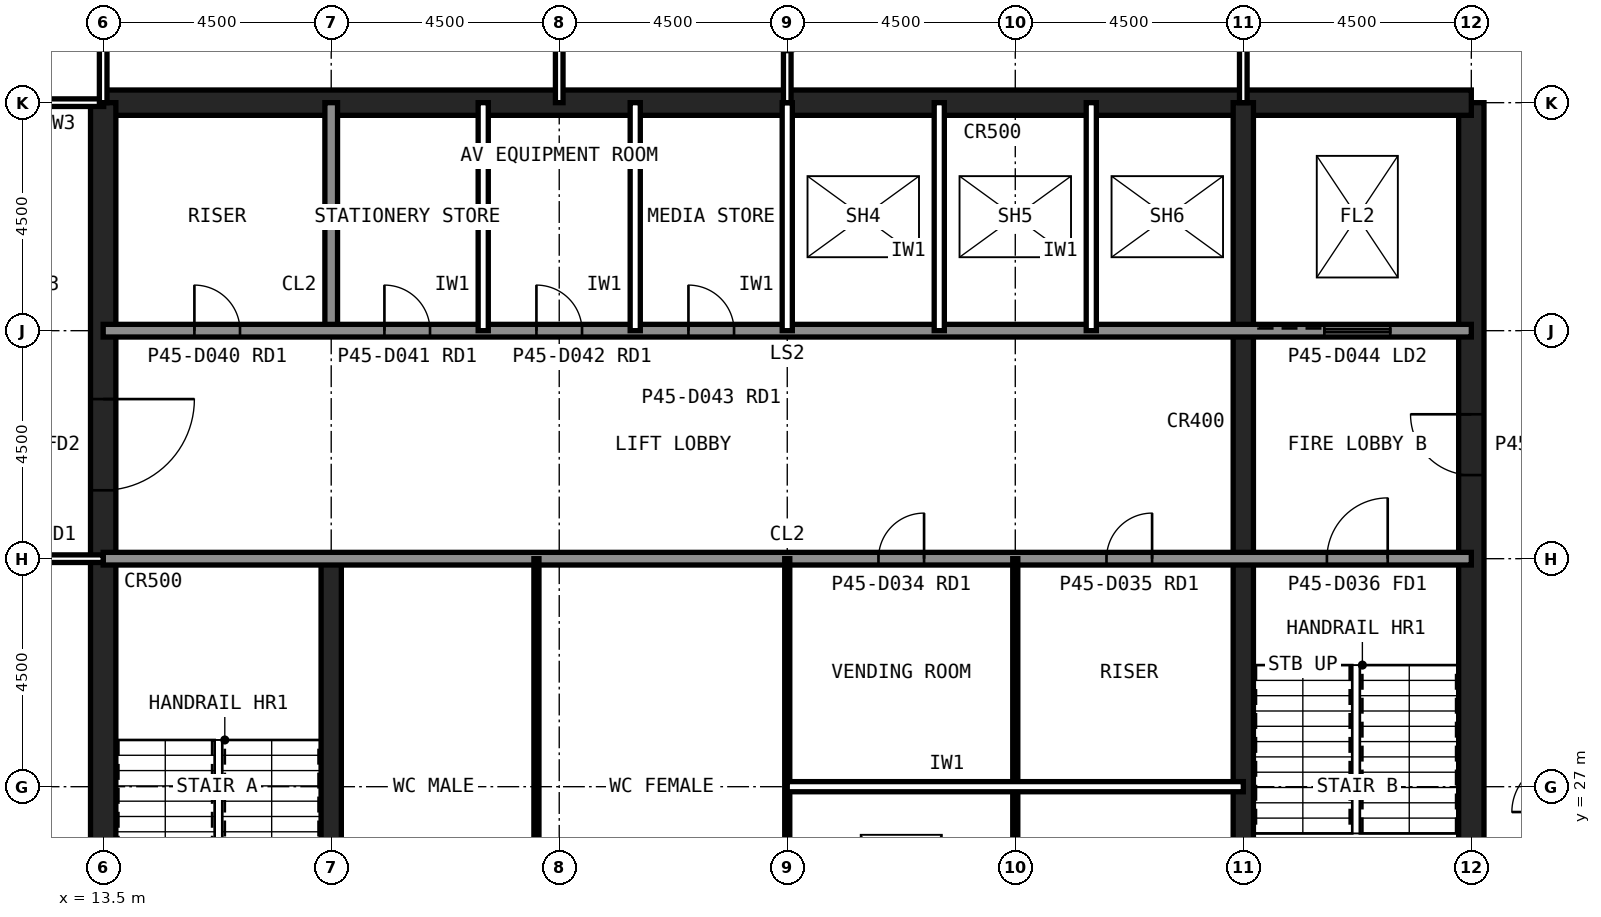
"""IFC4 building model, lengths in metres.
Left out: names, types, materials, properties, quantities, classifications, styles, units other than length and angle.
Written with IfcOpenShell. Run it as: python <this file> out.ifc"""

import sys

from ifc_helpers import new_model, si_unit, direction, frame, frame_2d, origin, place, context, subcontext, project, spatial, rectangle, extrude, element, fill, save


model = new_model("IFC4")
c1 = context("Model", 3, precision=1e-05, world=origin(), true_north=direction((0.0, 1.0)))
c2 = subcontext(c1, "Body", "Model", "MODEL_VIEW")
j1 = project(units=[si_unit("LENGTHUNIT", "METRE"), si_unit("PLANEANGLEUNIT", "RADIAN")], contexts=[c1])
p1 = place(None, origin())
s1 = spatial("IfcSite", under=j1, at=p1, CompositionType="ELEMENT")
p2 = place(p1, origin())
s2 = spatial("IfcBuilding", under=s1, at=p2, CompositionType="ELEMENT")
p3 = place(p2, frame((0.0, 0.0, 191.6)))
s3 = spatial("IfcBuildingStorey", under=s2, at=p3, CompositionType="ELEMENT", Elevation=191.6)
p4 = place(p3, frame((40.5, 13.5, 0.0), z_axis=(0.0, 0.0, 1.0), x_axis=(0.0, 1.0, 0.0)))
e1 = element("IfcWall", 1, at=p4, inside=s3, PredefinedType="SHEAR", context=c2, shape_type="SweptSolid", body=[
    extrude(rectangle(XDim=27.0, YDim=0.5, at=frame_2d((13.5, 0.0))), origin(), (0.0, 0.0, 1.0), 4.0),
])
p5 = place(p4, frame((5.85, 0.0, 0.0)))
e2 = element("IfcOpeningElement", 2, at=p5, cuts=e1, PredefinedType="OPENING", context=c2, shape_type="SweptSolid", body=[
    extrude(rectangle(XDim=1.8, YDim=2.1, at=frame_2d((0.9, 1.05))), frame((0.0, 0.26, 0.0), z_axis=(0.0, -1.0, 0.0), x_axis=(1.0, 0.0, 0.0)), (0.0, 0.0, 1.0), 0.52),
])
p6 = place(p4, frame((19.65, 0.0, 0.0)))
e3 = element("IfcOpeningElement", 3, at=p6, cuts=e1, PredefinedType="OPENING", context=c2, shape_type="SweptSolid", body=[
    extrude(rectangle(XDim=1.2, YDim=2.1, at=frame_2d((0.6, 1.05))), frame((0.0, 0.26, 0.0), z_axis=(0.0, -1.0, 0.0), x_axis=(1.0, 0.0, 0.0)), (0.0, 0.0, 1.0), 0.52),
])
p7 = place(p3, frame((40.5, 40.5, 0.0), z_axis=(0.0, 0.0, 1.0), x_axis=(-1.0, 0.0, 0.0)))
e4 = element("IfcWall", 4, at=p7, inside=s3, PredefinedType="SHEAR", context=c2, shape_type="SweptSolid", body=[
    extrude(rectangle(XDim=27.0, YDim=0.5, at=frame_2d((13.5, 0.0))), origin(), (0.0, 0.0, 1.0), 4.0),
])
p8 = place(p3, frame((13.5, 40.5, 0.0), z_axis=(0.0, 0.0, 1.0), x_axis=(0.0, -1.0, 0.0)))
e5 = element("IfcWall", 5, at=p8, inside=s3, PredefinedType="SHEAR", context=c2, shape_type="SweptSolid", body=[
    extrude(rectangle(XDim=27.0, YDim=0.5, at=frame_2d((13.5, 0.0))), origin(), (0.0, 0.0, 1.0), 4.0),
])
p9 = place(p8, frame((19.65, 0.0, 0.0)))
e6 = element("IfcOpeningElement", 6, at=p9, cuts=e5, PredefinedType="OPENING", context=c2, shape_type="SweptSolid", body=[
    extrude(rectangle(XDim=1.2, YDim=2.1, at=frame_2d((0.6, 1.05))), frame((0.0, 0.26, 0.0), z_axis=(0.0, -1.0, 0.0), x_axis=(1.0, 0.0, 0.0)), (0.0, 0.0, 1.0), 0.52),
])
p10 = place(p8, frame((5.85, 0.0, 0.0)))
e7 = element("IfcOpeningElement", 7, at=p10, cuts=e5, PredefinedType="OPENING", context=c2, shape_type="SweptSolid", body=[
    extrude(rectangle(XDim=1.8, YDim=2.1, at=frame_2d((0.9, 1.05))), frame((0.0, 0.26, 0.0), z_axis=(0.0, -1.0, 0.0), x_axis=(1.0, 0.0, 0.0)), (0.0, 0.0, 1.0), 0.52),
])
p11 = place(p3, frame((18.0, 13.5, 0.0), z_axis=(0.0, 0.0, 1.0), x_axis=(0.0, 1.0, 0.0)))
e8 = element("IfcWall", 8, at=p11, inside=s3, PredefinedType="SHEAR", context=c2, shape_type="SweptSolid", body=[
    extrude(rectangle(XDim=18.0, YDim=0.4, at=frame_2d((9.0, 0.0))), origin(), (0.0, 0.0, 1.0), 4.0),
])
p12 = place(p3, frame((18.0, 36.0, 0.0), z_axis=(0.0, 0.0, 1.0), x_axis=(0.0, 1.0, 0.0)))
e9 = element("IfcWall", 9, at=p12, inside=s3, PredefinedType="SOLIDWALL", context=c2, shape_type="SweptSolid", body=[
    extrude(rectangle(XDim=4.5, YDim=0.25, at=frame_2d((2.25, 0.0))), origin(), (0.0, 0.0, 1.0), 3.84),
])
p13 = place(p3, frame((36.0, 22.5, 0.0), z_axis=(0.0, 0.0, 1.0), x_axis=(0.0, 1.0, 0.0)))
e10 = element("IfcWall", 10, at=p13, inside=s3, PredefinedType="SHEAR", context=c2, shape_type="SweptSolid", body=[
    extrude(rectangle(XDim=18.0, YDim=0.4, at=frame_2d((9.0, 0.0))), origin(), (0.0, 0.0, 1.0), 4.0),
])
p14 = place(p3, frame((13.5, 36.0, 0.0), z_axis=(0.0, 0.0, 1.0), x_axis=(1.0, 0.0, 0.0)))
e11 = element("IfcWall", 11, at=p14, inside=s3, PredefinedType="SOLIDWALL", context=c2, shape_type="SweptSolid", body=[
    extrude(rectangle(XDim=27.0, YDim=0.25, at=frame_2d((13.5, 0.0))), origin(), (0.0, 0.0, 1.0), 3.84),
])
p15 = place(p14, frame((1.8, 0.0, 0.0)))
e12 = element("IfcOpeningElement", 12, at=p15, cuts=e11, PredefinedType="OPENING", context=c2, shape_type="SweptSolid", body=[
    extrude(rectangle(XDim=0.9, YDim=2.1, at=frame_2d((0.45, 1.05))), frame((0.0, 0.135, 0.0), z_axis=(0.0, -1.0, 0.0), x_axis=(1.0, 0.0, 0.0)), (0.0, 0.0, 1.0), 0.27),
])
p16 = place(p14, frame((5.55, 0.0, 0.0)))
e13 = element("IfcOpeningElement", 13, at=p16, cuts=e11, PredefinedType="OPENING", context=c2, shape_type="SweptSolid", body=[
    extrude(rectangle(XDim=0.9, YDim=2.1, at=frame_2d((0.45, 1.05))), frame((0.0, 0.135, 0.0), z_axis=(0.0, -1.0, 0.0), x_axis=(1.0, 0.0, 0.0)), (0.0, 0.0, 1.0), 0.27),
])
p17 = place(p14, frame((8.55, 0.0, 0.0)))
e14 = element("IfcOpeningElement", 14, at=p17, cuts=e11, PredefinedType="OPENING", context=c2, shape_type="SweptSolid", body=[
    extrude(rectangle(XDim=0.9, YDim=2.1, at=frame_2d((0.45, 1.05))), frame((0.0, 0.135, 0.0), z_axis=(0.0, -1.0, 0.0), x_axis=(1.0, 0.0, 0.0)), (0.0, 0.0, 1.0), 0.27),
])
p18 = place(p14, frame((11.55, 0.0, 0.0)))
e15 = element("IfcOpeningElement", 15, at=p18, cuts=e11, PredefinedType="OPENING", context=c2, shape_type="SweptSolid", body=[
    extrude(rectangle(XDim=0.9, YDim=2.1, at=frame_2d((0.45, 1.05))), frame((0.0, 0.135, 0.0), z_axis=(0.0, -1.0, 0.0), x_axis=(1.0, 0.0, 0.0)), (0.0, 0.0, 1.0), 0.27),
])
p19 = place(p14, frame((24.1, 0.0, 0.0)))
e16 = element("IfcOpeningElement", 16, at=p19, cuts=e11, PredefinedType="OPENING", context=c2, shape_type="SweptSolid", body=[
    extrude(rectangle(XDim=1.3, YDim=2.2, at=frame_2d((0.65, 1.1))), frame((0.0, 0.135, 0.0), z_axis=(0.0, -1.0, 0.0), x_axis=(1.0, 0.0, 0.0)), (0.0, 0.0, 1.0), 0.27),
])
p20 = place(p3, frame((13.5, 31.5, 0.0), z_axis=(0.0, 0.0, 1.0), x_axis=(1.0, 0.0, 0.0)))
e17 = element("IfcWall", 17, at=p20, inside=s3, PredefinedType="SOLIDWALL", context=c2, shape_type="SweptSolid", body=[
    extrude(rectangle(XDim=27.0, YDim=0.25, at=frame_2d((13.5, 0.0))), origin(), (0.0, 0.0, 1.0), 3.84),
])
p21 = place(p20, frame((24.15, 0.0, 0.0)))
e18 = element("IfcOpeningElement", 18, at=p21, cuts=e17, PredefinedType="OPENING", context=c2, shape_type="SweptSolid", body=[
    extrude(rectangle(XDim=1.2, YDim=2.1, at=frame_2d((0.6, 1.05))), frame((0.0, 0.135, 0.0), z_axis=(0.0, -1.0, 0.0), x_axis=(1.0, 0.0, 0.0)), (0.0, 0.0, 1.0), 0.27),
])
p22 = place(p20, frame((15.3, 0.0, 0.0)))
e19 = element("IfcOpeningElement", 19, at=p22, cuts=e17, PredefinedType="OPENING", context=c2, shape_type="SweptSolid", body=[
    extrude(rectangle(XDim=0.9, YDim=2.1, at=frame_2d((0.45, 1.05))), frame((0.0, 0.135, 0.0), z_axis=(0.0, -1.0, 0.0), x_axis=(1.0, 0.0, 0.0)), (0.0, 0.0, 1.0), 0.27),
])
p23 = place(p20, frame((19.8, 0.0, 0.0)))
e20 = element("IfcOpeningElement", 20, at=p23, cuts=e17, PredefinedType="OPENING", context=c2, shape_type="SweptSolid", body=[
    extrude(rectangle(XDim=0.9, YDim=2.1, at=frame_2d((0.45, 1.05))), frame((0.0, 0.135, 0.0), z_axis=(0.0, -1.0, 0.0), x_axis=(1.0, 0.0, 0.0)), (0.0, 0.0, 1.0), 0.27),
])
for number, where, z_axis, x_axis in (
    (21, (21.0, 36.0, 0.0), (0.0, 0.0, 1.0), (0.0, 1.0, 0.0)),
    (22, (24.0, 36.0, 0.0), (0.0, 0.0, 1.0), (0.0, 1.0, 0.0)),
    (23, (27.0, 36.0, 0.0), (0.0, 0.0, 1.0), (0.0, 1.0, 0.0)),
    (24, (30.0, 36.0, 0.0), (0.0, 0.0, 1.0), (0.0, 1.0, 0.0)),
    (25, (33.0, 36.0, 0.0), (0.0, 0.0, 1.0), (0.0, 1.0, 0.0)),
):
    element("IfcWall", number, at=place(p3, frame(where, z_axis=z_axis, x_axis=x_axis)), inside=s3, PredefinedType="PARTITIONING", context=c2, shape_type="SweptSolid", body=[
        extrude(rectangle(XDim=4.5, YDim=0.2, at=frame_2d((2.25, 0.0))), origin(), (0.0, 0.0, 1.0), 3.84),
    ])
for number, where, z_axis, x_axis in (
    (26, (22.05, 22.5, 0.0), (0.0, 0.0, 1.0), (0.0, 1.0, 0.0)),
    (27, (27.0, 22.5, 0.0), (0.0, 0.0, 1.0), (0.0, 1.0, 0.0)),
    (28, (31.5, 22.5, 0.0), (0.0, 0.0, 1.0), (0.0, 1.0, 0.0)),
):
    element("IfcWall", number, at=place(p3, frame(where, z_axis=z_axis, x_axis=x_axis)), inside=s3, PredefinedType="PLUMBINGWALL", context=c2, shape_type="SweptSolid", body=[
        extrude(rectangle(XDim=9.0, YDim=0.1, at=frame_2d((4.5, 0.0))), origin(), (0.0, 0.0, 1.0), 3.84),
    ])
p24 = place(p3, frame((27.0, 27.0, 0.0), z_axis=(0.0, 0.0, 1.0), x_axis=(1.0, 0.0, 0.0)))
e29 = element("IfcWall", 29, at=p24, inside=s3, PredefinedType="PARTITIONING", context=c2, shape_type="SweptSolid", body=[
    extrude(rectangle(XDim=9.0, YDim=0.2, at=frame_2d((4.5, 0.0))), origin(), (0.0, 0.0, 1.0), 3.84),
])
p25 = place(p3, frame((13.51, 40.5, 0.0), z_axis=(0.0, 0.0, 1.0), x_axis=(-1.0, 0.0, 0.0)))
e30 = element("IfcWall", 30, at=p25, inside=s3, PredefinedType="PARTITIONING", context=c2, shape_type="SweptSolid", body=[
    extrude(rectangle(XDim=1.81, YDim=0.15, at=frame_2d((0.905, 0.0))), origin(), (0.0, 0.0, 1.0), 2.989),
])
p26 = place(p3, frame((13.5, 31.5, 0.0), z_axis=(0.0, 0.0, 1.0), x_axis=(-1.0, 0.0, 0.0)))
e31 = element("IfcWall", 31, at=p26, inside=s3, PredefinedType="PARTITIONING", context=c2, shape_type="SweptSolid", body=[
    extrude(rectangle(XDim=3.6, YDim=0.15, at=frame_2d((1.8, 0.0))), origin(), (0.0, 0.0, 1.0), 2.989),
])
p27 = place(p26, frame((1.3, 0.0, 0.0)))
e32 = element("IfcOpeningElement", 32, at=p27, cuts=e31, PredefinedType="OPENING", context=c2, shape_type="SweptSolid", body=[
    extrude(rectangle(XDim=1.0, YDim=2.1, at=frame_2d((0.5, 1.05))), frame((0.0, 0.085, 0.0), z_axis=(0.0, -1.0, 0.0), x_axis=(1.0, 0.0, 0.0)), (0.0, 0.0, 1.0), 0.17),
])
p28 = place(p3, frame((36.0, 40.5, 0.0), z_axis=(0.0, 0.0, 1.0), x_axis=(0.0, 1.0, 0.0)))
e33 = element("IfcWall", 33, at=p28, inside=s3, PredefinedType="PARTITIONING", context=c2, shape_type="SweptSolid", body=[
    extrude(rectangle(XDim=3.0, YDim=0.15, at=frame_2d((1.5, 0.0))), origin(), (0.0, 0.0, 1.0), 2.989),
])
p29 = place(p3, frame((27.0, 43.5, 0.0), z_axis=(0.0, 0.0, 1.0), x_axis=(0.0, -1.0, 0.0)))
e34 = element("IfcWall", 34, at=p29, inside=s3, PredefinedType="PARTITIONING", context=c2, shape_type="SweptSolid", body=[
    extrude(rectangle(XDim=3.0, YDim=0.15, at=frame_2d((1.5, 0.0))), origin(), (0.0, 0.0, 1.0), 2.989),
])
p30 = place(p29, frame((1.0, 0.0, 0.0)))
e35 = element("IfcOpeningElement", 35, at=p30, cuts=e34, PredefinedType="OPENING", context=c2, shape_type="SweptSolid", body=[
    extrude(rectangle(XDim=1.0, YDim=2.1, at=frame_2d((0.5, 1.05))), frame((0.0, 0.085, 0.0), z_axis=(0.0, -1.0, 0.0), x_axis=(1.0, 0.0, 0.0)), (0.0, 0.0, 1.0), 0.17),
])
p31 = place(p3, frame((22.5, 40.5, 0.0), z_axis=(0.0, 0.0, 1.0), x_axis=(0.0, 1.0, 0.0)))
e36 = element("IfcWall", 36, at=p31, inside=s3, PredefinedType="PARTITIONING", context=c2, shape_type="SweptSolid", body=[
    extrude(rectangle(XDim=9.0, YDim=0.15, at=frame_2d((4.5, 0.0))), origin(), (0.0, 0.0, 1.0), 2.989),
])
p32 = place(p31, frame((4.0, 0.0, 0.0)))
e37 = element("IfcOpeningElement", 37, at=p32, cuts=e36, PredefinedType="OPENING", context=c2, shape_type="SweptSolid", body=[
    extrude(rectangle(XDim=1.0, YDim=2.1, at=frame_2d((0.5, 1.05))), frame((0.0, 0.085, 0.0), z_axis=(0.0, -1.0, 0.0), x_axis=(1.0, 0.0, 0.0)), (0.0, 0.0, 1.0), 0.17),
])
p33 = place(p3, frame((13.5, 40.5, 0.0), z_axis=(0.0, 0.0, 1.0), x_axis=(0.0, 1.0, 0.0)))
e38 = element("IfcWall", 38, at=p33, inside=s3, PredefinedType="PARTITIONING", context=c2, shape_type="SweptSolid", body=[
    extrude(rectangle(XDim=9.0, YDim=0.15, at=frame_2d((4.5, 0.0))), origin(), (0.0, 0.0, 1.0), 2.989),
])
p34 = place(p33, frame((4.0, 0.0, 0.0)))
e39 = element("IfcOpeningElement", 39, at=p34, cuts=e38, PredefinedType="OPENING", context=c2, shape_type="SweptSolid", body=[
    extrude(rectangle(XDim=1.0, YDim=2.1, at=frame_2d((0.5, 1.05))), frame((0.0, 0.085, 0.0), z_axis=(0.0, -1.0, 0.0), x_axis=(1.0, 0.0, 0.0)), (0.0, 0.0, 1.0), 0.17),
])
p35 = place(p10, origin())
e40 = element("IfcDoor", 40, at=p35, inside=s3, OperationType="SINGLE_SWING_LEFT", PredefinedType="DOOR", context=c2, shape_type="SweptSolid", body=[
    extrude(rectangle(XDim=1.8, YDim=2.1, at=frame_2d((0.9, 1.05))), frame((0.0, 0.025, 0.0), z_axis=(0.0, -1.0, 0.0), x_axis=(1.0, 0.0, 0.0)), (0.0, 0.0, 1.0), 0.05),
])
fill(e7, e40)
p36 = place(p6, origin())
e41 = element("IfcDoor", 41, at=p36, inside=s3, OperationType="SINGLE_SWING_RIGHT", PredefinedType="DOOR", context=c2, shape_type="SweptSolid", body=[
    extrude(rectangle(XDim=1.2, YDim=2.1, at=frame_2d((0.6, 1.05))), frame((0.0, 0.025, 0.0), z_axis=(0.0, -1.0, 0.0), x_axis=(1.0, 0.0, 0.0)), (0.0, 0.0, 1.0), 0.05),
])
fill(e3, e41)
p37 = place(p21, origin())
e42 = element("IfcDoor", 42, at=p37, inside=s3, OperationType="SINGLE_SWING_RIGHT", PredefinedType="DOOR", context=c2, shape_type="SweptSolid", body=[
    extrude(rectangle(XDim=1.2, YDim=2.1, at=frame_2d((0.6, 1.05))), frame((0.0, 0.025, 0.0), z_axis=(0.0, -1.0, 0.0), x_axis=(1.0, 0.0, 0.0)), (0.0, 0.0, 1.0), 0.05),
])
fill(e18, e42)
p38 = place(p22, origin())
e43 = element("IfcDoor", 43, at=p38, inside=s3, OperationType="SINGLE_SWING_RIGHT", PredefinedType="DOOR", context=c2, shape_type="SweptSolid", body=[
    extrude(rectangle(XDim=0.9, YDim=2.1, at=frame_2d((0.45, 1.05))), frame((0.0, 0.025, 0.0), z_axis=(0.0, -1.0, 0.0), x_axis=(1.0, 0.0, 0.0)), (0.0, 0.0, 1.0), 0.05),
])
fill(e19, e43)
p39 = place(p23, origin())
e44 = element("IfcDoor", 44, at=p39, inside=s3, OperationType="SINGLE_SWING_RIGHT", PredefinedType="DOOR", context=c2, shape_type="SweptSolid", body=[
    extrude(rectangle(XDim=0.9, YDim=2.1, at=frame_2d((0.45, 1.05))), frame((0.0, 0.025, 0.0), z_axis=(0.0, -1.0, 0.0), x_axis=(1.0, 0.0, 0.0)), (0.0, 0.0, 1.0), 0.05),
])
fill(e20, e44)
p40 = place(p15, origin())
e45 = element("IfcDoor", 45, at=p40, inside=s3, OperationType="SINGLE_SWING_LEFT", PredefinedType="DOOR", context=c2, shape_type="SweptSolid", body=[
    extrude(rectangle(XDim=0.9, YDim=2.1, at=frame_2d((0.45, 1.05))), frame((0.0, 0.025, 0.0), z_axis=(0.0, -1.0, 0.0), x_axis=(1.0, 0.0, 0.0)), (0.0, 0.0, 1.0), 0.05),
])
fill(e12, e45)
p41 = place(p16, origin())
e46 = element("IfcDoor", 46, at=p41, inside=s3, OperationType="SINGLE_SWING_LEFT", PredefinedType="DOOR", context=c2, shape_type="SweptSolid", body=[
    extrude(rectangle(XDim=0.9, YDim=2.1, at=frame_2d((0.45, 1.05))), frame((0.0, 0.025, 0.0), z_axis=(0.0, -1.0, 0.0), x_axis=(1.0, 0.0, 0.0)), (0.0, 0.0, 1.0), 0.05),
])
fill(e13, e46)
p42 = place(p17, origin())
e47 = element("IfcDoor", 47, at=p42, inside=s3, OperationType="SINGLE_SWING_LEFT", PredefinedType="DOOR", context=c2, shape_type="SweptSolid", body=[
    extrude(rectangle(XDim=0.9, YDim=2.1, at=frame_2d((0.45, 1.05))), frame((0.0, 0.025, 0.0), z_axis=(0.0, -1.0, 0.0), x_axis=(1.0, 0.0, 0.0)), (0.0, 0.0, 1.0), 0.05),
])
fill(e14, e47)
p43 = place(p18, origin())
e48 = element("IfcDoor", 48, at=p43, inside=s3, OperationType="SINGLE_SWING_LEFT", PredefinedType="DOOR", context=c2, shape_type="SweptSolid", body=[
    extrude(rectangle(XDim=0.9, YDim=2.1, at=frame_2d((0.45, 1.05))), frame((0.0, 0.025, 0.0), z_axis=(0.0, -1.0, 0.0), x_axis=(1.0, 0.0, 0.0)), (0.0, 0.0, 1.0), 0.05),
])
fill(e15, e48)
p44 = place(p19, origin())
e49 = element("IfcDoor", 49, at=p44, inside=s3, OperationType="SLIDING_TO_LEFT", PredefinedType="DOOR", context=c2, shape_type="SweptSolid", body=[
    extrude(rectangle(XDim=1.3, YDim=2.2, at=frame_2d((0.65, 1.1))), frame((0.0, 0.025, 0.0), z_axis=(0.0, -1.0, 0.0), x_axis=(1.0, 0.0, 0.0)), (0.0, 0.0, 1.0), 0.05),
])
fill(e16, e49)
save(model, sys.argv[1])
